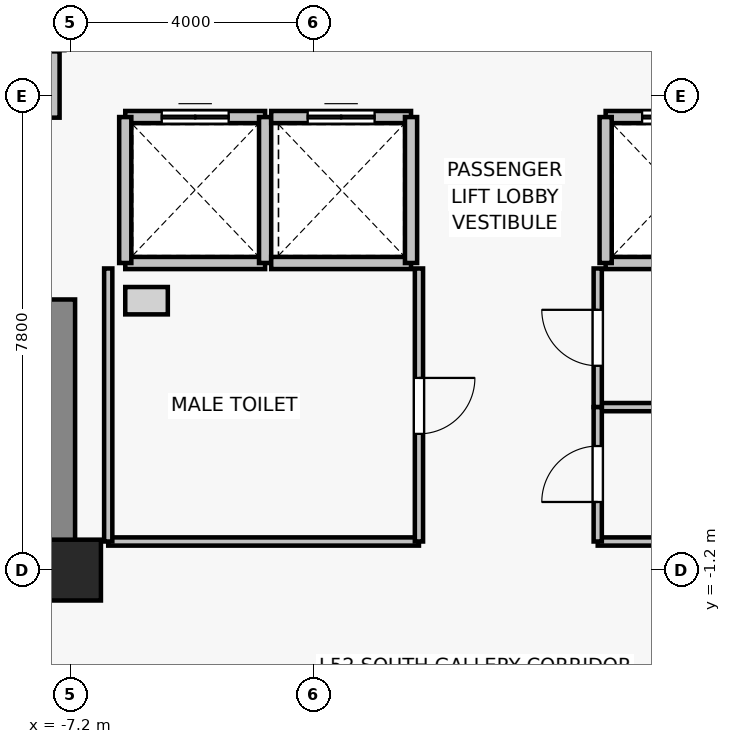
"""IFC4 building model, lengths in metres.
Left out: names, types, materials, properties, quantities, classifications, styles, units other than length and angle.
Written with IfcOpenShell. Run it as: python <this file> out.ifc"""

import sys

from ifc_helpers import new_model, si_unit, direction, frame, frame_2d, origin, origin_2d, place, context, subcontext, project, spatial, rectangle, extrude, source, transform, mapped, element, fill, save


model = new_model("IFC4")
c1 = context("Model", 3, precision=1e-05, world=origin(), true_north=direction((0.0, 1.0)))
c2 = subcontext(c1, "Body", "Model", "MODEL_VIEW")
j1 = project(units=[si_unit("LENGTHUNIT", "METRE"), si_unit("PLANEANGLEUNIT", "RADIAN")], contexts=[c1])
p1 = place(None, origin())
s1 = spatial("IfcSite", under=j1, at=p1, CompositionType="ELEMENT")
p2 = place(p1, origin())
s2 = spatial("IfcBuilding", under=s1, at=p2, CompositionType="ELEMENT")
p3 = place(p2, frame((0.0, 0.0, 185.8)))
s3 = spatial("IfcBuildingStorey", under=s2, at=p3, CompositionType="ELEMENT", Elevation=185.8)
p4 = place(p3, frame((-7.2, -1.2, 0.0), z_axis=(0.0, 0.0, 1.0), x_axis=(1.0, 0.0, 0.0)))
e1 = element("IfcColumn", 1, at=p4, inside=s3, PredefinedType="COLUMN", context=c2, shape_type="SweptSolid", body=[
    extrude(rectangle(XDim=1.0, YDim=1.0, at=origin_2d()), origin(), (0.0, 0.0, 1.0), 3.3),
])
p5 = place(p3, frame((-7.4, -0.825, 0.0), z_axis=(0.0, 0.0, 1.0), x_axis=(0.0, 1.0, 0.0)))
e2 = element("IfcWall", 2, at=p5, inside=s3, PredefinedType="SHEAR", context=c2, shape_type="SweptSolid", body=[
    extrude(rectangle(XDim=4.075, YDim=0.55, at=frame_2d((2.038, 0.0))), origin(), (0.0, 0.0, 1.0), 3.075),
])
p6 = place(p3, frame((-4.0, 3.85, 0.0), z_axis=(0.0, 0.0, 1.0), x_axis=(-1.0, 0.0, 0.0)))
e3 = element("IfcWall", 3, at=p6, inside=s3, PredefinedType="SOLIDWALL", context=c2, shape_type="SweptSolid", body=[
    extrude(rectangle(XDim=2.3, YDim=0.2, at=frame_2d((1.15, 0.0))), origin(), (0.0, 0.0, 1.0), 3.075),
])
p7 = place(p3, frame((-6.3, 6.25, 0.0), z_axis=(0.0, 0.0, 1.0), x_axis=(1.0, 0.0, 0.0)))
e4 = element("IfcWall", 4, at=p7, inside=s3, PredefinedType="SOLIDWALL", context=c2, shape_type="SweptSolid", body=[
    extrude(rectangle(XDim=2.3, YDim=0.2, at=frame_2d((1.15, 0.0))), origin(), (0.0, 0.0, 1.0), 3.075),
])
p8 = place(p7, frame((0.6, 0.0, 0.0)))
e5 = element("IfcOpeningElement", 5, at=p8, cuts=e4, PredefinedType="OPENING", context=c2, shape_type="SweptSolid", body=[
    extrude(rectangle(XDim=1.1, YDim=2.2, at=frame_2d((0.55, 1.1))), frame((0.0, 0.11, 0.0), z_axis=(0.0, -1.0, 0.0), x_axis=(1.0, 0.0, 0.0)), (0.0, 0.0, 1.0), 0.22),
])
for number, where, z_axis, x_axis in (
    (6, (-6.3, 3.85, 0.0), (0.0, 0.0, 1.0), (0.0, 1.0, 0.0)),
    (7, (-4.0, 6.25, 0.0), (0.0, 0.0, 1.0), (0.0, -1.0, 0.0)),
):
    element("IfcWall", number, at=place(p3, frame(where, z_axis=z_axis, x_axis=x_axis)), inside=s3, PredefinedType="SOLIDWALL", context=c2, shape_type="SweptSolid", body=[
        extrude(rectangle(XDim=2.4, YDim=0.2, at=frame_2d((1.2, 0.0))), origin(), (0.0, 0.0, 1.0), 3.075),
    ])
p9 = place(p3, frame((-1.6, 3.85, 0.0), z_axis=(0.0, 0.0, 1.0), x_axis=(-1.0, 0.0, 0.0)))
e8 = element("IfcWall", 8, at=p9, inside=s3, PredefinedType="SOLIDWALL", context=c2, shape_type="SweptSolid", body=[
    extrude(rectangle(XDim=2.3, YDim=0.2, at=frame_2d((1.15, 0.0))), origin(), (0.0, 0.0, 1.0), 3.075),
])
p10 = place(p3, frame((-3.9, 6.25, 0.0), z_axis=(0.0, 0.0, 1.0), x_axis=(1.0, 0.0, 0.0)))
e9 = element("IfcWall", 9, at=p10, inside=s3, PredefinedType="SOLIDWALL", context=c2, shape_type="SweptSolid", body=[
    extrude(rectangle(XDim=2.3, YDim=0.2, at=frame_2d((1.15, 0.0))), origin(), (0.0, 0.0, 1.0), 3.075),
])
p11 = place(p10, frame((0.6, 0.0, 0.0)))
e10 = element("IfcOpeningElement", 10, at=p11, cuts=e9, PredefinedType="OPENING", context=c2, shape_type="SweptSolid", body=[
    extrude(rectangle(XDim=1.1, YDim=2.2, at=frame_2d((0.55, 1.1))), frame((0.0, 0.11, 0.0), z_axis=(0.0, -1.0, 0.0), x_axis=(1.0, 0.0, 0.0)), (0.0, 0.0, 1.0), 0.22),
])
p12 = place(p3, frame((-1.6, 6.25, 0.0), z_axis=(0.0, 0.0, 1.0), x_axis=(0.0, -1.0, 0.0)))
e11 = element("IfcWall", 11, at=p12, inside=s3, PredefinedType="SOLIDWALL", context=c2, shape_type="SweptSolid", body=[
    extrude(rectangle(XDim=2.4, YDim=0.2, at=frame_2d((1.2, 0.0))), origin(), (0.0, 0.0, 1.0), 3.075),
])
p13 = place(p3, frame((3.9, 3.85, 0.0), z_axis=(0.0, 0.0, 1.0), x_axis=(-1.0, 0.0, 0.0)))
e12 = element("IfcWall", 12, at=p13, inside=s3, PredefinedType="SOLIDWALL", context=c2, shape_type="SweptSolid", body=[
    extrude(rectangle(XDim=2.3, YDim=0.2, at=frame_2d((1.15, 0.0))), origin(), (0.0, 0.0, 1.0), 3.075),
])
p14 = place(p3, frame((1.6, 6.25, 0.0), z_axis=(0.0, 0.0, 1.0), x_axis=(1.0, 0.0, 0.0)))
e13 = element("IfcWall", 13, at=p14, inside=s3, PredefinedType="SOLIDWALL", context=c2, shape_type="SweptSolid", body=[
    extrude(rectangle(XDim=2.3, YDim=0.2, at=frame_2d((1.15, 0.0))), origin(), (0.0, 0.0, 1.0), 3.075),
])
p15 = place(p14, frame((0.6, 0.0, 0.0)))
e14 = element("IfcOpeningElement", 14, at=p15, cuts=e13, PredefinedType="OPENING", context=c2, shape_type="SweptSolid", body=[
    extrude(rectangle(XDim=1.1, YDim=2.2, at=frame_2d((0.55, 1.1))), frame((0.0, 0.11, 0.0), z_axis=(0.0, -1.0, 0.0), x_axis=(1.0, 0.0, 0.0)), (0.0, 0.0, 1.0), 0.22),
])
p16 = place(p3, frame((1.6, 3.85, 0.0), z_axis=(0.0, 0.0, 1.0), x_axis=(0.0, 1.0, 0.0)))
e15 = element("IfcWall", 15, at=p16, inside=s3, PredefinedType="SOLIDWALL", context=c2, shape_type="SweptSolid", body=[
    extrude(rectangle(XDim=2.4, YDim=0.2, at=frame_2d((1.2, 0.0))), origin(), (0.0, 0.0, 1.0), 3.075),
])
p17 = place(p3, frame((-7.4, 7.35, 0.0), z_axis=(0.0, 0.0, 1.0), x_axis=(-1.0, 0.0, 0.0)))
e16 = element("IfcWall", 16, at=p17, inside=s3, PredefinedType="SOLIDWALL", context=c2, shape_type="SweptSolid", body=[
    extrude(rectangle(XDim=2.2, YDim=0.2, at=frame_2d((1.1, 0.0))), origin(), (0.0, 0.0, 1.0), 2.565),
])
p18 = place(p3, frame((-7.47, 7.33, 0.0), z_axis=(0.0, 0.0, 1.0), x_axis=(0.0, -1.0, 0.0)))
e17 = element("IfcWall", 17, at=p18, inside=s3, PredefinedType="PARTITIONING", context=c2, shape_type="SweptSolid", body=[
    extrude(rectangle(XDim=1.09, YDim=0.18, at=frame_2d((0.545, 0.0))), origin(), (0.0, 0.0, 1.0), 2.565),
])
p19 = place(p3, frame((-1.47, -0.73, 0.0), z_axis=(0.0, 0.0, 1.0), x_axis=(-1.0, 0.0, 0.0)))
e18 = element("IfcWall", 18, at=p19, inside=s3, PredefinedType="PARTITIONING", context=c2, shape_type="SweptSolid", body=[
    extrude(rectangle(XDim=5.11, YDim=0.135, at=frame_2d((2.555, 0.0))), origin(), (0.0, 0.0, 1.0), 3.075),
])
p20 = place(p3, frame((-6.58, -0.73, 0.0), z_axis=(0.0, 0.0, 1.0), x_axis=(0.0, 1.0, 0.0)))
e19 = element("IfcWall", 19, at=p20, inside=s3, PredefinedType="PARTITIONING", context=c2, shape_type="SweptSolid", body=[
    extrude(rectangle(XDim=4.49, YDim=0.135, at=frame_2d((2.245, 0.0))), origin(), (0.0, 0.0, 1.0), 3.075),
])
p21 = place(p3, frame((-1.47, 3.76, 0.0), z_axis=(0.0, 0.0, 1.0), x_axis=(0.0, -1.0, 0.0)))
e20 = element("IfcWall", 20, at=p21, inside=s3, PredefinedType="PARTITIONING", context=c2, shape_type="SweptSolid", body=[
    extrude(rectangle(XDim=4.49, YDim=0.135, at=frame_2d((2.245, 0.0))), origin(), (0.0, 0.0, 1.0), 3.075),
])
p22 = place(p21, frame((1.8, 0.0, 0.0)))
e21 = element("IfcOpeningElement", 21, at=p22, cuts=e20, PredefinedType="OPENING", context=c2, shape_type="SweptSolid", body=[
    extrude(rectangle(XDim=0.92, YDim=2.1, at=frame_2d((0.46, 1.05))), frame((0.0, 0.077, 0.0), z_axis=(0.0, -1.0, 0.0), x_axis=(1.0, 0.0, 0.0)), (0.0, 0.0, 1.0), 0.155),
])
p23 = place(p3, frame((6.58, 1.48, 0.0), z_axis=(0.0, 0.0, 1.0), x_axis=(-1.0, 0.0, 0.0)))
e22 = element("IfcWall", 22, at=p23, inside=s3, PredefinedType="PARTITIONING", context=c2, shape_type="SweptSolid", body=[
    extrude(rectangle(XDim=5.11, YDim=0.135, at=frame_2d((2.555, 0.0))), origin(), (0.0, 0.0, 1.0), 3.075),
])
p24 = place(p3, frame((1.47, 1.48, 0.0), z_axis=(0.0, 0.0, 1.0), x_axis=(0.0, 1.0, 0.0)))
e23 = element("IfcWall", 23, at=p24, inside=s3, PredefinedType="PARTITIONING", context=c2, shape_type="SweptSolid", body=[
    extrude(rectangle(XDim=2.28, YDim=0.135, at=frame_2d((1.14, 0.0))), origin(), (0.0, 0.0, 1.0), 3.075),
])
p25 = place(p24, frame((0.68, 0.0, 0.0)))
e24 = element("IfcOpeningElement", 24, at=p25, cuts=e23, PredefinedType="OPENING", context=c2, shape_type="SweptSolid", body=[
    extrude(rectangle(XDim=0.92, YDim=2.1, at=frame_2d((0.46, 1.05))), frame((0.0, 0.077, 0.0), z_axis=(0.0, -1.0, 0.0), x_axis=(1.0, 0.0, 0.0)), (0.0, 0.0, 1.0), 0.155),
])
p26 = place(p3, frame((4.18, -0.73, 0.0), z_axis=(0.0, 0.0, 1.0), x_axis=(-1.0, 0.0, 0.0)))
e25 = element("IfcWall", 25, at=p26, inside=s3, PredefinedType="PARTITIONING", context=c2, shape_type="SweptSolid", body=[
    extrude(rectangle(XDim=2.71, YDim=0.135, at=frame_2d((1.355, 0.0))), origin(), (0.0, 0.0, 1.0), 3.075),
])
p27 = place(p3, frame((1.47, -0.73, 0.0), z_axis=(0.0, 0.0, 1.0), x_axis=(0.0, 1.0, 0.0)))
e26 = element("IfcWall", 26, at=p27, inside=s3, PredefinedType="PARTITIONING", context=c2, shape_type="SweptSolid", body=[
    extrude(rectangle(XDim=2.21, YDim=0.135, at=frame_2d((1.105, 0.0))), origin(), (0.0, 0.0, 1.0), 3.075),
])
p28 = place(p27, frame((0.65, 0.0, 0.0)))
e27 = element("IfcOpeningElement", 27, at=p28, cuts=e26, PredefinedType="OPENING", context=c2, shape_type="SweptSolid", body=[
    extrude(rectangle(XDim=0.92, YDim=2.1, at=frame_2d((0.46, 1.05))), frame((0.0, 0.077, 0.0), z_axis=(0.0, -1.0, 0.0), x_axis=(1.0, 0.0, 0.0)), (0.0, 0.0, 1.0), 0.155),
])
m1 = source(origin(), c2, "Body", "SweptSolid", [
    extrude(rectangle(XDim=1.1, YDim=2.2, at=frame_2d((0.55, 1.1))), frame((0.0, 0.025, 0.0), z_axis=(0.0, -1.0, 0.0), x_axis=(1.0, 0.0, 0.0)), (0.0, 0.0, 1.0), 0.05),
])
p29 = place(p8, origin())
e28 = element("IfcDoor", 28, at=p29, inside=s3, OperationType="DOUBLE_DOOR_SLIDING", PredefinedType="DOOR", context=c2, shape_type="MappedRepresentation", body=[
    mapped(m1, transform((0.0, 0.0, 0.0), x_axis=(1.0, 0.0, 0.0), y_axis=(0.0, 1.0, 0.0), z_axis=(0.0, 0.0, 1.0), scale=1.0)),
])
fill(e5, e28)
p30 = place(p11, origin())
e29 = element("IfcDoor", 29, at=p30, inside=s3, OperationType="DOUBLE_DOOR_SLIDING", PredefinedType="DOOR", context=c2, shape_type="MappedRepresentation", body=[
    mapped(m1, transform((0.0, 0.0, 0.0), x_axis=(1.0, 0.0, 0.0), y_axis=(0.0, 1.0, 0.0), z_axis=(0.0, 0.0, 1.0), scale=1.0)),
])
fill(e10, e29)
p31 = place(p15, origin())
e30 = element("IfcDoor", 30, at=p31, inside=s3, OperationType="DOUBLE_DOOR_SLIDING", PredefinedType="DOOR", context=c2, shape_type="MappedRepresentation", body=[
    mapped(m1, transform((0.0, 0.0, 0.0), x_axis=(1.0, 0.0, 0.0), y_axis=(0.0, 1.0, 0.0), z_axis=(0.0, 0.0, 1.0), scale=1.0)),
])
fill(e14, e30)
m2 = source(origin(), c2, "Body", "SweptSolid", [
    extrude(rectangle(XDim=0.92, YDim=2.1, at=frame_2d((0.46, 1.05))), frame((0.0, 0.025, 0.0), z_axis=(0.0, -1.0, 0.0), x_axis=(1.0, 0.0, 0.0)), (0.0, 0.0, 1.0), 0.05),
])
p32 = place(p22, origin())
e31 = element("IfcDoor", 31, at=p32, inside=s3, OperationType="SINGLE_SWING_LEFT", PredefinedType="DOOR", context=c2, shape_type="MappedRepresentation", body=[
    mapped(m2, transform((0.0, 0.0, 0.0), x_axis=(1.0, 0.0, 0.0), y_axis=(0.0, 1.0, 0.0), z_axis=(0.0, 0.0, 1.0), scale=1.0)),
])
fill(e21, e31)
p33 = place(p25, origin())
e32 = element("IfcDoor", 32, at=p33, inside=s3, OperationType="SINGLE_SWING_RIGHT", PredefinedType="DOOR", context=c2, shape_type="MappedRepresentation", body=[
    mapped(m2, transform((0.0, 0.0, 0.0), x_axis=(1.0, 0.0, 0.0), y_axis=(0.0, 1.0, 0.0), z_axis=(0.0, 0.0, 1.0), scale=1.0)),
])
fill(e24, e32)
p34 = place(p28, origin())
e33 = element("IfcDoor", 33, at=p34, inside=s3, OperationType="SINGLE_SWING_LEFT", PredefinedType="DOOR", context=c2, shape_type="MappedRepresentation", body=[
    mapped(m2, transform((0.0, 0.0, 0.0), x_axis=(1.0, 0.0, 0.0), y_axis=(0.0, 1.0, 0.0), z_axis=(0.0, 0.0, 1.0), scale=1.0)),
])
fill(e27, e33)
save(model, sys.argv[1])
